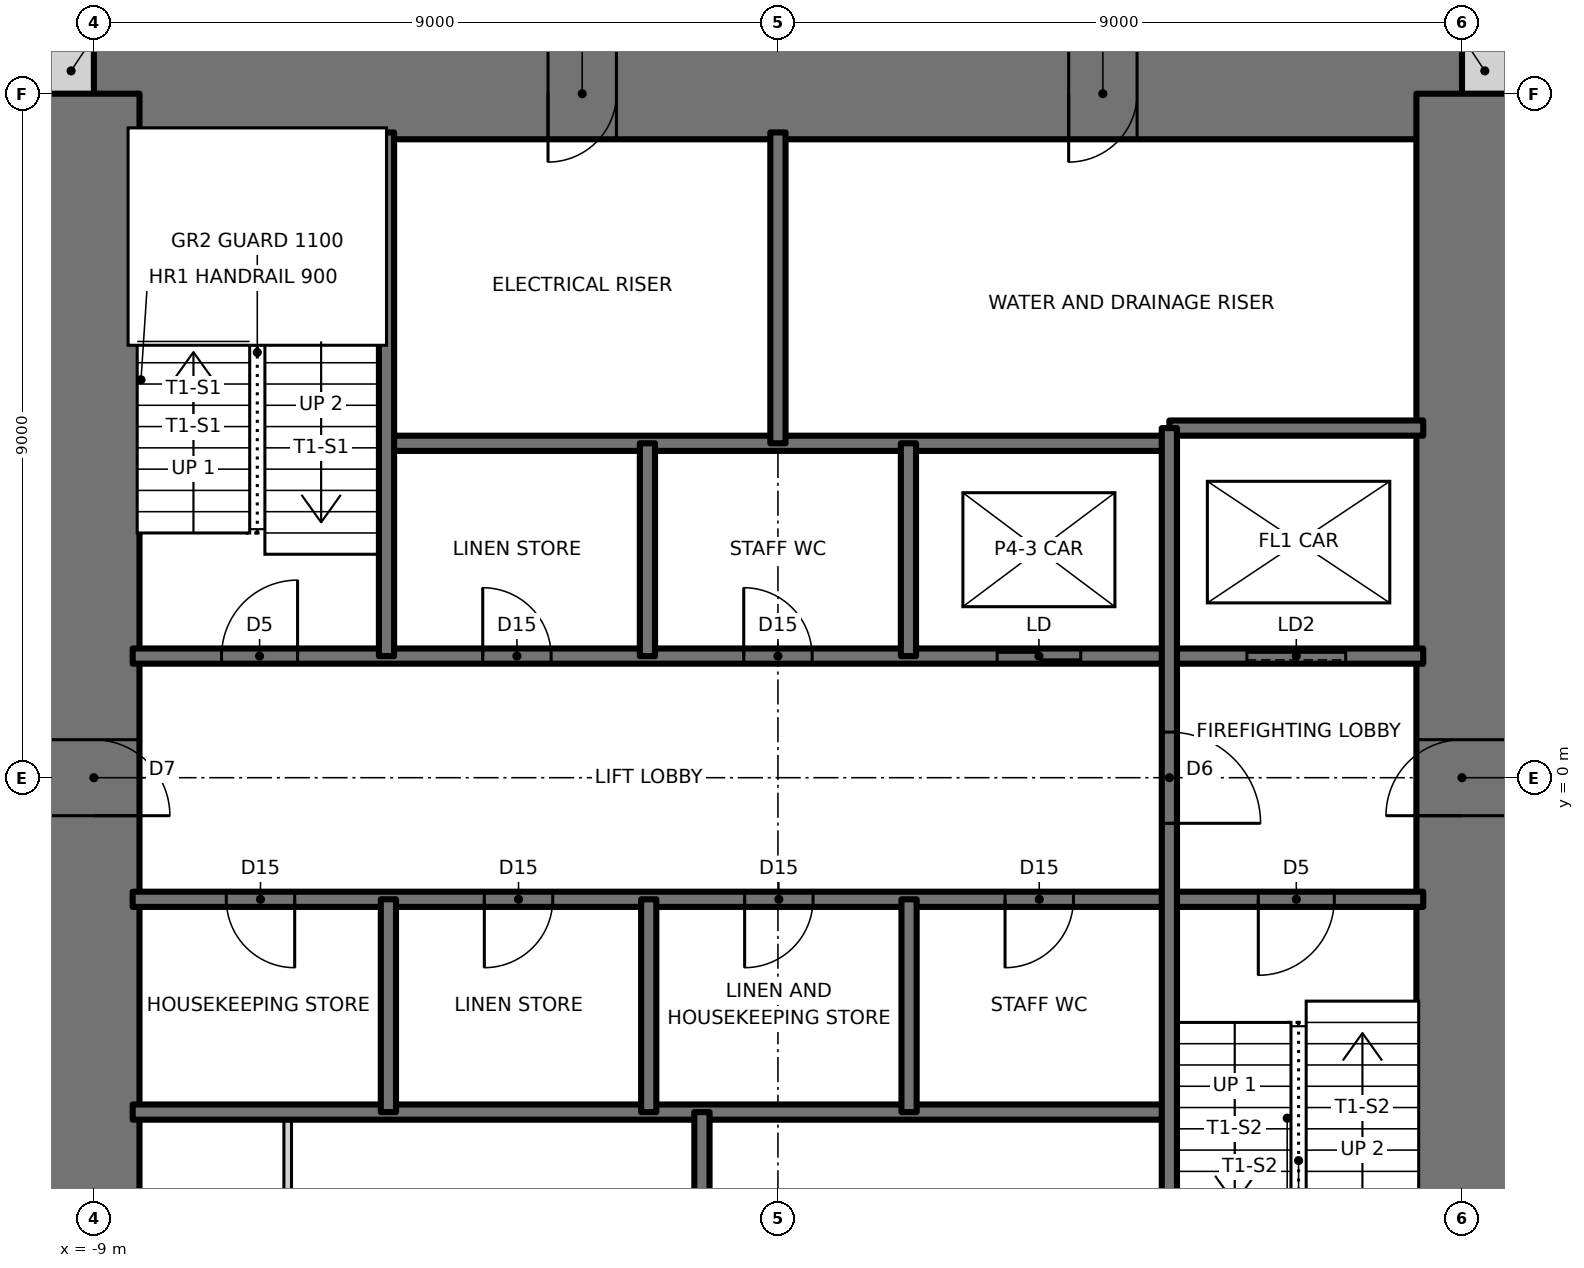
"""IFC4 building model, lengths in metres.
Left out: names, types, materials, properties, quantities, classifications, styles, units other than length and angle.
Written with IfcOpenShell. Run it as: python <this file> out.ifc"""

import sys

from ifc_helpers import new_model, si_unit, direction, frame, frame_2d, origin, place, context, subcontext, project, spatial, rectangle, extrude, element, fill, save


model = new_model("IFC4")
c1 = context("Model", 3, precision=1e-05, world=origin(), true_north=direction((0.0, 1.0)))
c2 = subcontext(c1, "Body", "Model", "MODEL_VIEW")
j1 = project(units=[si_unit("LENGTHUNIT", "METRE"), si_unit("PLANEANGLEUNIT", "RADIAN")], contexts=[c1])
p1 = place(None, origin())
s1 = spatial("IfcSite", under=j1, at=p1, CompositionType="ELEMENT")
p2 = place(p1, origin())
s2 = spatial("IfcBuilding", under=s1, at=p2, CompositionType="ELEMENT")
p3 = place(p2, frame((0.0, 0.0, 246.5)))
s3 = spatial("IfcBuildingStorey", under=s2, at=p3, CompositionType="ELEMENT", Elevation=246.5)
for number, where, z_axis, x_axis in (
    (1, (9.0, 9.3, 0.0), (0.0, 0.0, 1.0), (1.0, 0.0, 0.0)),
    (2, (-9.6, 9.3, 0.0), (0.0, 0.0, 1.0), (1.0, 0.0, 0.0)),
):
    element("IfcWall", number, at=place(p3, frame(where, z_axis=z_axis, x_axis=x_axis)), inside=s3, PredefinedType="SOLIDWALL", context=c2, shape_type="SweptSolid", body=[
        extrude(rectangle(XDim=0.6, YDim=0.6, at=frame_2d((0.3, 0.0))), origin(), (0.0, 0.0, 1.0), 3.5),
    ])
p4 = place(p3, frame((9.0, 9.0, 0.0), z_axis=(0.0, 0.0, 1.0), x_axis=(-1.0, 0.0, 0.0)))
e3 = element("IfcWall", 3, at=p4, inside=s3, PredefinedType="SHEAR", context=c2, shape_type="SweptSolid", body=[
    extrude(rectangle(XDim=18.0, YDim=1.2, at=frame_2d((9.0, 0.0))), origin(), (0.0, 0.0, 1.0), 3.5),
])
p5 = place(p4, frame((11.125, 0.0, 0.0)))
e4 = element("IfcOpeningElement", 4, at=p5, cuts=e3, PredefinedType="OPENING", context=c2, shape_type="SweptSolid", body=[
    extrude(rectangle(XDim=0.9, YDim=2.1, at=frame_2d((0.45, 1.05))), frame((0.0, 0.61, 0.0), z_axis=(0.0, -1.0, 0.0), x_axis=(1.0, 0.0, 0.0)), (0.0, 0.0, 1.0), 1.22),
])
p6 = place(p4, frame((4.275, 0.0, 0.0)))
e5 = element("IfcOpeningElement", 5, at=p6, cuts=e3, PredefinedType="OPENING", context=c2, shape_type="SweptSolid", body=[
    extrude(rectangle(XDim=0.9, YDim=2.1, at=frame_2d((0.45, 1.05))), frame((0.0, 0.61, 0.0), z_axis=(0.0, -1.0, 0.0), x_axis=(1.0, 0.0, 0.0)), (0.0, 0.0, 1.0), 1.22),
])
p7 = place(p3, frame((9.0, -9.0, 0.0), z_axis=(0.0, 0.0, 1.0), x_axis=(0.0, 1.0, 0.0)))
e6 = element("IfcWall", 6, at=p7, inside=s3, PredefinedType="SHEAR", context=c2, shape_type="SweptSolid", body=[
    extrude(rectangle(XDim=18.0, YDim=1.2, at=frame_2d((9.0, 0.0))), origin(), (0.0, 0.0, 1.0), 3.5),
])
p8 = place(p7, frame((8.5, 0.0, 0.0)))
e7 = element("IfcOpeningElement", 7, at=p8, cuts=e6, PredefinedType="OPENING", context=c2, shape_type="SweptSolid", body=[
    extrude(rectangle(XDim=1.0, YDim=2.1, at=frame_2d((0.5, 1.05))), frame((0.0, 0.61, 0.0), z_axis=(0.0, -1.0, 0.0), x_axis=(1.0, 0.0, 0.0)), (0.0, 0.0, 1.0), 1.22),
])
p9 = place(p3, frame((-9.0, 9.0, 0.0), z_axis=(0.0, 0.0, 1.0), x_axis=(0.0, -1.0, 0.0)))
e8 = element("IfcWall", 8, at=p9, inside=s3, PredefinedType="SHEAR", context=c2, shape_type="SweptSolid", body=[
    extrude(rectangle(XDim=18.0, YDim=1.2, at=frame_2d((9.0, 0.0))), origin(), (0.0, 0.0, 1.0), 3.5),
])
p10 = place(p9, frame((8.5, 0.0, 0.0)))
e9 = element("IfcOpeningElement", 9, at=p10, cuts=e8, PredefinedType="OPENING", context=c2, shape_type="SweptSolid", body=[
    extrude(rectangle(XDim=1.0, YDim=2.1, at=frame_2d((0.5, 1.05))), frame((0.0, 0.61, 0.0), z_axis=(0.0, -1.0, 0.0), x_axis=(1.0, 0.0, 0.0)), (0.0, 0.0, 1.0), 1.22),
])
p11 = place(p3, frame((-8.49, -4.4, 0.0), z_axis=(0.0, 0.0, 1.0), x_axis=(1.0, 0.0, 0.0)))
e10 = element("IfcWall", 10, at=p11, inside=s3, PredefinedType="SOLIDWALL", context=c2, shape_type="SweptSolid", body=[
    extrude(rectangle(XDim=13.64, YDim=0.2, at=frame_2d((6.82, 0.0))), origin(), (0.0, 0.0, 1.0), 3.5),
])
p12 = place(p3, frame((-8.49, -1.6, 0.0), z_axis=(0.0, 0.0, 1.0), x_axis=(1.0, 0.0, 0.0)))
e11 = element("IfcWall", 11, at=p12, inside=s3, PredefinedType="SOLIDWALL", context=c2, shape_type="SweptSolid", body=[
    extrude(rectangle(XDim=16.98, YDim=0.2, at=frame_2d((8.49, 0.0))), origin(), (0.0, 0.0, 1.0), 3.5),
])
p13 = place(p12, frame((14.81, 0.0, 0.0)))
e12 = element("IfcOpeningElement", 12, at=p13, cuts=e11, PredefinedType="OPENING", context=c2, shape_type="SweptSolid", body=[
    extrude(rectangle(XDim=1.0, YDim=2.1, at=frame_2d((0.5, 1.05))), frame((0.0, 0.11, 0.0), z_axis=(0.0, -1.0, 0.0), x_axis=(1.0, 0.0, 0.0)), (0.0, 0.0, 1.0), 0.22),
])
p14 = place(p12, frame((1.232, 0.0, 0.0)))
e13 = element("IfcOpeningElement", 13, at=p14, cuts=e11, PredefinedType="OPENING", context=c2, shape_type="SweptSolid", body=[
    extrude(rectangle(XDim=0.9, YDim=2.1, at=frame_2d((0.45, 1.05))), frame((0.0, 0.11, 0.0), z_axis=(0.0, -1.0, 0.0), x_axis=(1.0, 0.0, 0.0)), (0.0, 0.0, 1.0), 0.22),
])
p15 = place(p12, frame((4.627, 0.0, 0.0)))
e14 = element("IfcOpeningElement", 14, at=p15, cuts=e11, PredefinedType="OPENING", context=c2, shape_type="SweptSolid", body=[
    extrude(rectangle(XDim=0.9, YDim=2.1, at=frame_2d((0.45, 1.05))), frame((0.0, 0.11, 0.0), z_axis=(0.0, -1.0, 0.0), x_axis=(1.0, 0.0, 0.0)), (0.0, 0.0, 1.0), 0.22),
])
p16 = place(p12, frame((8.052, 0.0, 0.0)))
e15 = element("IfcOpeningElement", 15, at=p16, cuts=e11, PredefinedType="OPENING", context=c2, shape_type="SweptSolid", body=[
    extrude(rectangle(XDim=0.9, YDim=2.1, at=frame_2d((0.45, 1.05))), frame((0.0, 0.11, 0.0), z_axis=(0.0, -1.0, 0.0), x_axis=(1.0, 0.0, 0.0)), (0.0, 0.0, 1.0), 0.22),
])
p17 = place(p12, frame((11.478, 0.0, 0.0)))
e16 = element("IfcOpeningElement", 16, at=p17, cuts=e11, PredefinedType="OPENING", context=c2, shape_type="SweptSolid", body=[
    extrude(rectangle(XDim=0.9, YDim=2.1, at=frame_2d((0.45, 1.05))), frame((0.0, 0.11, 0.0), z_axis=(0.0, -1.0, 0.0), x_axis=(1.0, 0.0, 0.0)), (0.0, 0.0, 1.0), 0.22),
])
p18 = place(p3, frame((-8.49, 1.6, 0.0), z_axis=(0.0, 0.0, 1.0), x_axis=(1.0, 0.0, 0.0)))
e17 = element("IfcWall", 17, at=p18, inside=s3, PredefinedType="SOLIDWALL", context=c2, shape_type="SweptSolid", body=[
    extrude(rectangle(XDim=16.98, YDim=0.2, at=frame_2d((8.49, 0.0))), origin(), (0.0, 0.0, 1.0), 3.5),
])
p19 = place(p18, frame((1.17, 0.0, 0.0)))
e18 = element("IfcOpeningElement", 18, at=p19, cuts=e17, PredefinedType="OPENING", context=c2, shape_type="SweptSolid", body=[
    extrude(rectangle(XDim=1.0, YDim=2.1, at=frame_2d((0.5, 1.05))), frame((0.0, 0.11, 0.0), z_axis=(0.0, -1.0, 0.0), x_axis=(1.0, 0.0, 0.0)), (0.0, 0.0, 1.0), 0.22),
])
p20 = place(p18, frame((4.606, 0.0, 0.0)))
e19 = element("IfcOpeningElement", 19, at=p20, cuts=e17, PredefinedType="OPENING", context=c2, shape_type="SweptSolid", body=[
    extrude(rectangle(XDim=0.9, YDim=2.1, at=frame_2d((0.45, 1.05))), frame((0.0, 0.11, 0.0), z_axis=(0.0, -1.0, 0.0), x_axis=(1.0, 0.0, 0.0)), (0.0, 0.0, 1.0), 0.22),
])
p21 = place(p18, frame((8.04, 0.0, 0.0)))
e20 = element("IfcOpeningElement", 20, at=p21, cuts=e17, PredefinedType="OPENING", context=c2, shape_type="SweptSolid", body=[
    extrude(rectangle(XDim=0.9, YDim=2.1, at=frame_2d((0.45, 1.05))), frame((0.0, 0.11, 0.0), z_axis=(0.0, -1.0, 0.0), x_axis=(1.0, 0.0, 0.0)), (0.0, 0.0, 1.0), 0.22),
])
p22 = place(p18, frame((11.374, 0.0, 0.0)))
e21 = element("IfcOpeningElement", 21, at=p22, cuts=e17, PredefinedType="OPENING", context=c2, shape_type="SweptSolid", body=[
    extrude(rectangle(XDim=1.1, YDim=2.1, at=frame_2d((0.55, 1.05))), frame((0.0, 0.11, 0.0), z_axis=(0.0, -1.0, 0.0), x_axis=(1.0, 0.0, 0.0)), (0.0, 0.0, 1.0), 0.22),
])
p23 = place(p18, frame((14.66, 0.0, 0.0)))
e22 = element("IfcOpeningElement", 22, at=p23, cuts=e17, PredefinedType="OPENING", context=c2, shape_type="SweptSolid", body=[
    extrude(rectangle(XDim=1.3, YDim=2.1, at=frame_2d((0.65, 1.05))), frame((0.0, 0.11, 0.0), z_axis=(0.0, -1.0, 0.0), x_axis=(1.0, 0.0, 0.0)), (0.0, 0.0, 1.0), 0.22),
])
p24 = place(p3, frame((-5.15, 4.4, 0.0), z_axis=(0.0, 0.0, 1.0), x_axis=(1.0, 0.0, 0.0)))
e23 = element("IfcWall", 23, at=p24, inside=s3, PredefinedType="SOLIDWALL", context=c2, shape_type="SweptSolid", body=[
    extrude(rectangle(XDim=10.3, YDim=0.2, at=frame_2d((5.15, 0.0))), origin(), (0.0, 0.0, 1.0), 3.5),
])
p25 = place(p3, frame((5.15, 4.6, 0.0), z_axis=(0.0, 0.0, 1.0), x_axis=(1.0, 0.0, 0.0)))
e24 = element("IfcWall", 24, at=p25, inside=s3, PredefinedType="SOLIDWALL", context=c2, shape_type="SweptSolid", body=[
    extrude(rectangle(XDim=3.34, YDim=0.2, at=frame_2d((1.67, 0.0))), origin(), (0.0, 0.0, 1.0), 3.5),
])
p26 = place(p3, frame((5.15, -8.49, 0.0), z_axis=(0.0, 0.0, 1.0), x_axis=(0.0, 1.0, 0.0)))
e25 = element("IfcWall", 25, at=p26, inside=s3, PredefinedType="SOLIDWALL", context=c2, shape_type="SweptSolid", body=[
    extrude(rectangle(XDim=13.09, YDim=0.2, at=frame_2d((6.545, 0.0))), origin(), (0.0, 0.0, 1.0), 3.5),
])
p27 = place(p26, frame((7.89, 0.0, 0.0)))
e26 = element("IfcOpeningElement", 26, at=p27, cuts=e25, PredefinedType="OPENING", context=c2, shape_type="SweptSolid", body=[
    extrude(rectangle(XDim=1.2, YDim=2.1, at=frame_2d((0.6, 1.05))), frame((0.0, 0.11, 0.0), z_axis=(0.0, -1.0, 0.0), x_axis=(1.0, 0.0, 0.0)), (0.0, 0.0, 1.0), 0.22),
])
for number, where, z_axis, x_axis in (
    (27, (1.725, -4.4, 0.0), (0.0, 0.0, 1.0), (0.0, 1.0, 0.0)),
    (28, (1.717, 1.6, 0.0), (0.0, 0.0, 1.0), (0.0, 1.0, 0.0)),
):
    element("IfcWall", number, at=place(p3, frame(where, z_axis=z_axis, x_axis=x_axis)), inside=s3, PredefinedType="SOLIDWALL", context=c2, shape_type="SweptSolid", body=[
        extrude(rectangle(XDim=2.8, YDim=0.2, at=frame_2d((1.4, 0.0))), origin(), (0.0, 0.0, 1.0), 3.5),
    ])
for number, where, z_axis, x_axis in (
    (29, (0.0, 4.4, 0.0), (0.0, 0.0, 1.0), (0.0, 1.0, 0.0)),
    (30, (-1.0, -8.49, 0.0), (0.0, 0.0, 1.0), (0.0, 1.0, 0.0)),
):
    element("IfcWall", number, at=place(p3, frame(where, z_axis=z_axis, x_axis=x_axis)), inside=s3, PredefinedType="SOLIDWALL", context=c2, shape_type="SweptSolid", body=[
        extrude(rectangle(XDim=4.09, YDim=0.2, at=frame_2d((2.045, 0.0))), origin(), (0.0, 0.0, 1.0), 3.5),
    ])
for number, where, z_axis, x_axis in (
    (31, (-1.7, -4.4, 0.0), (0.0, 0.0, 1.0), (0.0, 1.0, 0.0)),
    (32, (-1.717, 1.6, 0.0), (0.0, 0.0, 1.0), (0.0, 1.0, 0.0)),
    (33, (-5.125, -4.4, 0.0), (0.0, 0.0, 1.0), (0.0, 1.0, 0.0)),
):
    element("IfcWall", number, at=place(p3, frame(where, z_axis=z_axis, x_axis=x_axis)), inside=s3, PredefinedType="SOLIDWALL", context=c2, shape_type="SweptSolid", body=[
        extrude(rectangle(XDim=2.8, YDim=0.2, at=frame_2d((1.4, 0.0))), origin(), (0.0, 0.0, 1.0), 3.5),
    ])
p28 = place(p3, frame((-5.15, 1.6, 0.0), z_axis=(0.0, 0.0, 1.0), x_axis=(0.0, 1.0, 0.0)))
e34 = element("IfcWall", 34, at=p28, inside=s3, PredefinedType="SOLIDWALL", context=c2, shape_type="SweptSolid", body=[
    extrude(rectangle(XDim=6.89, YDim=0.2, at=frame_2d((3.445, 0.0))), origin(), (0.0, 0.0, 1.0), 3.5),
])
p29 = place(p3, frame((-6.45, -8.49, 0.0), z_axis=(0.0, 0.0, 1.0), x_axis=(0.0, 1.0, 0.0)))
e35 = element("IfcWall", 35, at=p29, inside=s3, PredefinedType="PARTITIONING", context=c2, shape_type="SweptSolid", body=[
    extrude(rectangle(XDim=4.09, YDim=0.1, at=frame_2d((2.045, 0.0))), origin(), (0.0, 0.0, 1.0), 3.3),
])
p30 = place(p29, frame((1.595, 0.0, 0.0)))
e36 = element("IfcOpeningElement", 36, at=p30, cuts=e35, PredefinedType="OPENING", context=c2, shape_type="SweptSolid", body=[
    extrude(rectangle(XDim=0.9, YDim=2.1, at=frame_2d((0.45, 1.05))), frame((0.0, 0.06, 0.0), z_axis=(0.0, -1.0, 0.0), x_axis=(1.0, 0.0, 0.0)), (0.0, 0.0, 1.0), 0.12),
])
p31 = place(p19, origin())
e37 = element("IfcDoor", 37, at=p31, inside=s3, OperationType="SINGLE_SWING_RIGHT", PredefinedType="DOOR", context=c2, shape_type="SweptSolid", body=[
    extrude(rectangle(XDim=1.0, YDim=2.1, at=frame_2d((0.5, 1.05))), frame((0.0, 0.025, 0.0), z_axis=(0.0, -1.0, 0.0), x_axis=(1.0, 0.0, 0.0)), (0.0, 0.0, 1.0), 0.05),
])
fill(e18, e37)
p32 = place(p13, frame((1.0, 0.0, 0.0), z_axis=(0.0, 0.0, 1.0), x_axis=(-1.0, 0.0, 0.0)))
e38 = element("IfcDoor", 38, at=p32, inside=s3, OperationType="SINGLE_SWING_RIGHT", PredefinedType="DOOR", context=c2, shape_type="SweptSolid", body=[
    extrude(rectangle(XDim=1.0, YDim=2.1, at=frame_2d((0.5, 1.05))), frame((0.0, 0.025, 0.0), z_axis=(0.0, -1.0, 0.0), x_axis=(1.0, 0.0, 0.0)), (0.0, 0.0, 1.0), 0.05),
])
fill(e12, e38)
p33 = place(p27, frame((1.2, 0.0, 0.0), z_axis=(0.0, 0.0, 1.0), x_axis=(-1.0, 0.0, 0.0)))
e39 = element("IfcDoor", 39, at=p33, inside=s3, OperationType="SINGLE_SWING_RIGHT", PredefinedType="DOOR", context=c2, shape_type="SweptSolid", body=[
    extrude(rectangle(XDim=1.2, YDim=2.1, at=frame_2d((0.6, 1.05))), frame((0.0, 0.025, 0.0), z_axis=(0.0, -1.0, 0.0), x_axis=(1.0, 0.0, 0.0)), (0.0, 0.0, 1.0), 0.05),
])
fill(e26, e39)
p34 = place(p20, origin())
e40 = element("IfcDoor", 40, at=p34, inside=s3, OperationType="SINGLE_SWING_LEFT", PredefinedType="DOOR", context=c2, shape_type="SweptSolid", body=[
    extrude(rectangle(XDim=0.9, YDim=2.1, at=frame_2d((0.45, 1.05))), frame((0.0, 0.025, 0.0), z_axis=(0.0, -1.0, 0.0), x_axis=(1.0, 0.0, 0.0)), (0.0, 0.0, 1.0), 0.05),
])
fill(e19, e40)
p35 = place(p21, origin())
e41 = element("IfcDoor", 41, at=p35, inside=s3, OperationType="SINGLE_SWING_LEFT", PredefinedType="DOOR", context=c2, shape_type="SweptSolid", body=[
    extrude(rectangle(XDim=0.9, YDim=2.1, at=frame_2d((0.45, 1.05))), frame((0.0, 0.025, 0.0), z_axis=(0.0, -1.0, 0.0), x_axis=(1.0, 0.0, 0.0)), (0.0, 0.0, 1.0), 0.05),
])
fill(e20, e41)
p36 = place(p14, frame((0.9, 0.0, 0.0), z_axis=(0.0, 0.0, 1.0), x_axis=(-1.0, 0.0, 0.0)))
e42 = element("IfcDoor", 42, at=p36, inside=s3, OperationType="SINGLE_SWING_LEFT", PredefinedType="DOOR", context=c2, shape_type="SweptSolid", body=[
    extrude(rectangle(XDim=0.9, YDim=2.1, at=frame_2d((0.45, 1.05))), frame((0.0, 0.025, 0.0), z_axis=(0.0, -1.0, 0.0), x_axis=(1.0, 0.0, 0.0)), (0.0, 0.0, 1.0), 0.05),
])
fill(e13, e42)
p37 = place(p15, frame((0.9, 0.0, 0.0), z_axis=(0.0, 0.0, 1.0), x_axis=(-1.0, 0.0, 0.0)))
e43 = element("IfcDoor", 43, at=p37, inside=s3, OperationType="SINGLE_SWING_RIGHT", PredefinedType="DOOR", context=c2, shape_type="SweptSolid", body=[
    extrude(rectangle(XDim=0.9, YDim=2.1, at=frame_2d((0.45, 1.05))), frame((0.0, 0.025, 0.0), z_axis=(0.0, -1.0, 0.0), x_axis=(1.0, 0.0, 0.0)), (0.0, 0.0, 1.0), 0.05),
])
fill(e14, e43)
p38 = place(p16, frame((0.9, 0.0, 0.0), z_axis=(0.0, 0.0, 1.0), x_axis=(-1.0, 0.0, 0.0)))
e44 = element("IfcDoor", 44, at=p38, inside=s3, OperationType="SINGLE_SWING_RIGHT", PredefinedType="DOOR", context=c2, shape_type="SweptSolid", body=[
    extrude(rectangle(XDim=0.9, YDim=2.1, at=frame_2d((0.45, 1.05))), frame((0.0, 0.025, 0.0), z_axis=(0.0, -1.0, 0.0), x_axis=(1.0, 0.0, 0.0)), (0.0, 0.0, 1.0), 0.05),
])
fill(e15, e44)
p39 = place(p17, frame((0.9, 0.0, 0.0), z_axis=(0.0, 0.0, 1.0), x_axis=(-1.0, 0.0, 0.0)))
e45 = element("IfcDoor", 45, at=p39, inside=s3, OperationType="SINGLE_SWING_RIGHT", PredefinedType="DOOR", context=c2, shape_type="SweptSolid", body=[
    extrude(rectangle(XDim=0.9, YDim=2.1, at=frame_2d((0.45, 1.05))), frame((0.0, 0.025, 0.0), z_axis=(0.0, -1.0, 0.0), x_axis=(1.0, 0.0, 0.0)), (0.0, 0.0, 1.0), 0.05),
])
fill(e16, e45)
p40 = place(p10, origin())
e46 = element("IfcDoor", 46, at=p40, inside=s3, OperationType="SINGLE_SWING_RIGHT", PredefinedType="DOOR", context=c2, shape_type="SweptSolid", body=[
    extrude(rectangle(XDim=1.0, YDim=2.1, at=frame_2d((0.5, 1.05))), frame((0.0, 0.025, 0.0), z_axis=(0.0, -1.0, 0.0), x_axis=(1.0, 0.0, 0.0)), (0.0, 0.0, 1.0), 0.05),
])
fill(e9, e46)
p41 = place(p8, origin())
e47 = element("IfcDoor", 47, at=p41, inside=s3, OperationType="SINGLE_SWING_LEFT", PredefinedType="DOOR", context=c2, shape_type="SweptSolid", body=[
    extrude(rectangle(XDim=1.0, YDim=2.1, at=frame_2d((0.5, 1.05))), frame((0.0, 0.025, 0.0), z_axis=(0.0, -1.0, 0.0), x_axis=(1.0, 0.0, 0.0)), (0.0, 0.0, 1.0), 0.05),
])
fill(e7, e47)
p42 = place(p5, origin())
e48 = element("IfcDoor", 48, at=p42, inside=s3, OperationType="SINGLE_SWING_RIGHT", PredefinedType="DOOR", context=c2, shape_type="SweptSolid", body=[
    extrude(rectangle(XDim=0.9, YDim=2.1, at=frame_2d((0.45, 1.05))), frame((0.0, 0.025, 0.0), z_axis=(0.0, -1.0, 0.0), x_axis=(1.0, 0.0, 0.0)), (0.0, 0.0, 1.0), 0.05),
])
fill(e4, e48)
p43 = place(p6, origin())
e49 = element("IfcDoor", 49, at=p43, inside=s3, OperationType="SINGLE_SWING_RIGHT", PredefinedType="DOOR", context=c2, shape_type="SweptSolid", body=[
    extrude(rectangle(XDim=0.9, YDim=2.1, at=frame_2d((0.45, 1.05))), frame((0.0, 0.025, 0.0), z_axis=(0.0, -1.0, 0.0), x_axis=(1.0, 0.0, 0.0)), (0.0, 0.0, 1.0), 0.05),
])
fill(e5, e49)
p44 = place(p22, origin())
e50 = element("IfcDoor", 50, at=p44, inside=s3, OperationType="DOUBLE_DOOR_SLIDING", PredefinedType="DOOR", context=c2, shape_type="SweptSolid", body=[
    extrude(rectangle(XDim=1.1, YDim=2.1, at=frame_2d((0.55, 1.05))), frame((0.0, 0.025, 0.0), z_axis=(0.0, -1.0, 0.0), x_axis=(1.0, 0.0, 0.0)), (0.0, 0.0, 1.0), 0.05),
])
fill(e21, e50)
p45 = place(p23, origin())
e51 = element("IfcDoor", 51, at=p45, inside=s3, OperationType="SLIDING_TO_LEFT", PredefinedType="DOOR", context=c2, shape_type="SweptSolid", body=[
    extrude(rectangle(XDim=1.3, YDim=2.1, at=frame_2d((0.65, 1.05))), frame((0.0, 0.025, 0.0), z_axis=(0.0, -1.0, 0.0), x_axis=(1.0, 0.0, 0.0)), (0.0, 0.0, 1.0), 0.05),
])
fill(e22, e51)
save(model, sys.argv[1])
